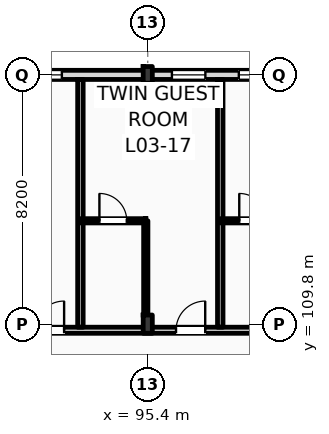
"""IFC4 building model, lengths in metres.
Left out: names, types, materials, properties, quantities, classifications, styles, units other than length and angle.
Written with IfcOpenShell. Run it as: python <this file> out.ifc"""

import sys

from ifc_helpers import new_model, si_unit, direction, frame, frame_2d, origin, origin_2d, place, context, subcontext, project, spatial, rectangle, i_section, extrude, element, fill, save


model = new_model("IFC4")
c1 = context("Model", 3, precision=1e-05, world=origin(), true_north=direction((0.0, 1.0)))
c2 = subcontext(c1, "Body", "Model", "MODEL_VIEW")
j1 = project(units=[si_unit("LENGTHUNIT", "METRE"), si_unit("PLANEANGLEUNIT", "RADIAN")], contexts=[c1])
p1 = place(None, origin())
s1 = spatial("IfcSite", under=j1, at=p1, CompositionType="ELEMENT")
p2 = place(p1, origin())
s2 = spatial("IfcBuilding", under=s1, at=p2, CompositionType="ELEMENT")
p3 = place(p2, frame((0.0, 0.0, 16.2)))
s3 = spatial("IfcBuildingStorey", under=s2, at=p3, CompositionType="ELEMENT", Elevation=16.2)
p4 = place(p3, frame((95.4, 109.8, 0.0), z_axis=(0.0, 0.0, 1.0), x_axis=(1.0, 0.0, 0.0)))
e1 = element("IfcColumn", 1, at=p4, inside=s3, PredefinedType="COLUMN", context=c2, shape_type="SweptSolid", body=[
    extrude(i_section(OverallWidth=0.3, OverallDepth=0.6, WebThickness=0.015, FlangeThickness=0.03, FilletRadius=0.027, at=origin_2d()), origin(), (0.0, 0.0, 1.0), 4.2),
])
p5 = place(p3, frame((95.4, 118.0, 0.0), z_axis=(0.0, 0.0, 1.0), x_axis=(1.0, 0.0, 0.0)))
e2 = element("IfcColumn", 2, at=p5, inside=s3, PredefinedType="COLUMN", context=c2, shape_type="SweptSolid", body=[
    extrude(i_section(OverallWidth=0.3, OverallDepth=0.55, WebThickness=0.015, FlangeThickness=0.029, FilletRadius=0.027, at=origin_2d()), origin(), (0.0, 0.0, 1.0), 4.2),
])
p6 = place(p3, frame((22.5, 118.0, 0.0), z_axis=(0.0, 0.0, 1.0), x_axis=(1.0, 0.0, 0.0)))
e3 = element("IfcWall", 3, at=p6, inside=s3, PredefinedType="STANDARD", context=c2, shape_type="SweptSolid", body=[
    extrude(rectangle(XDim=97.5, YDim=0.3, at=frame_2d((48.75, 0.0))), origin(), (0.0, 0.0, 1.0), 3.36),
])
p7 = place(p6, frame((3.721, 0.0, 0.9)))
e4 = element("IfcOpeningElement", 4, at=p7, cuts=e3, PredefinedType="OPENING", context=c2, shape_type="SweptSolid", body=[
    extrude(rectangle(XDim=0.9, YDim=1.8, at=frame_2d((0.45, 0.9))), frame((0.0, 0.16, 0.0), z_axis=(0.0, -1.0, 0.0), x_axis=(1.0, 0.0, 0.0)), (0.0, 0.0, 1.0), 0.32),
])
p8 = place(p6, frame((6.447, 0.0, 0.9)))
e5 = element("IfcOpeningElement", 5, at=p8, cuts=e3, PredefinedType="OPENING", context=c2, shape_type="SweptSolid", body=[
    extrude(rectangle(XDim=1.35, YDim=1.85, at=frame_2d((0.675, 0.925))), frame((0.0, 0.16, 0.0), z_axis=(0.0, -1.0, 0.0), x_axis=(1.0, 0.0, 0.0)), (0.0, 0.0, 1.0), 0.32),
])
p9 = place(p6, frame((11.363, 0.0, 0.9)))
e6 = element("IfcOpeningElement", 6, at=p9, cuts=e3, PredefinedType="OPENING", context=c2, shape_type="SweptSolid", body=[
    extrude(rectangle(XDim=1.5, YDim=1.9, at=frame_2d((0.75, 0.95))), frame((0.0, 0.16, 0.0), z_axis=(0.0, -1.0, 0.0), x_axis=(1.0, 0.0, 0.0)), (0.0, 0.0, 1.0), 0.32),
])
p10 = place(p6, frame((15.078, 0.0, 0.9)))
e7 = element("IfcOpeningElement", 7, at=p10, cuts=e3, PredefinedType="OPENING", context=c2, shape_type="SweptSolid", body=[
    extrude(rectangle(XDim=1.65, YDim=1.95, at=frame_2d((0.825, 0.975))), frame((0.0, 0.16, 0.0), z_axis=(0.0, -1.0, 0.0), x_axis=(1.0, 0.0, 0.0)), (0.0, 0.0, 1.0), 0.32),
])
p11 = place(p6, frame((19.395, 0.0, 0.9)))
e8 = element("IfcOpeningElement", 8, at=p11, cuts=e3, PredefinedType="OPENING", context=c2, shape_type="SweptSolid", body=[
    extrude(rectangle(XDim=1.8, YDim=2.0, at=frame_2d((0.9, 1.0))), frame((0.0, 0.16, 0.0), z_axis=(0.0, -1.0, 0.0), x_axis=(1.0, 0.0, 0.0)), (0.0, 0.0, 1.0), 0.32),
])
p12 = place(p6, frame((23.31, 0.0, 0.9)))
e9 = element("IfcOpeningElement", 9, at=p12, cuts=e3, PredefinedType="OPENING", context=c2, shape_type="SweptSolid", body=[
    extrude(rectangle(XDim=1.95, YDim=2.05, at=frame_2d((0.975, 1.025))), frame((0.0, 0.16, 0.0), z_axis=(0.0, -1.0, 0.0), x_axis=(1.0, 0.0, 0.0)), (0.0, 0.0, 1.0), 0.32),
])
p13 = place(p6, frame((28.026, 0.0, 0.9)))
e10 = element("IfcOpeningElement", 10, at=p13, cuts=e3, PredefinedType="OPENING", context=c2, shape_type="SweptSolid", body=[
    extrude(rectangle(XDim=2.1, YDim=2.1, at=frame_2d((1.05, 1.05))), frame((0.0, 0.16, 0.0), z_axis=(0.0, -1.0, 0.0), x_axis=(1.0, 0.0, 0.0)), (0.0, 0.0, 1.0), 0.32),
])
p14 = place(p6, frame((31.941, 0.0, 0.9)))
e11 = element("IfcOpeningElement", 11, at=p14, cuts=e3, PredefinedType="OPENING", context=c2, shape_type="SweptSolid", body=[
    extrude(rectangle(XDim=1.1, YDim=2.15, at=frame_2d((0.55, 1.075))), frame((0.0, 0.16, 0.0), z_axis=(0.0, -1.0, 0.0), x_axis=(1.0, 0.0, 0.0)), (0.0, 0.0, 1.0), 0.32),
])
p15 = place(p6, frame((36.657, 0.0, 0.9)))
e12 = element("IfcOpeningElement", 12, at=p15, cuts=e3, PredefinedType="OPENING", context=c2, shape_type="SweptSolid", body=[
    extrude(rectangle(XDim=2.4, YDim=2.2, at=frame_2d((1.2, 1.1))), frame((0.0, 0.16, 0.0), z_axis=(0.0, -1.0, 0.0), x_axis=(1.0, 0.0, 0.0)), (0.0, 0.0, 1.0), 0.32),
])
p16 = place(p6, frame((42.574, 0.0, 0.9)))
e13 = element("IfcOpeningElement", 13, at=p16, cuts=e3, PredefinedType="OPENING", context=c2, shape_type="SweptSolid", body=[
    extrude(rectangle(XDim=1.35, YDim=2.25, at=frame_2d((0.675, 1.125))), frame((0.0, 0.16, 0.0), z_axis=(0.0, -1.0, 0.0), x_axis=(1.0, 0.0, 0.0)), (0.0, 0.0, 1.0), 0.32),
])
p17 = place(p6, frame((45.289, 0.0, 0.9)))
e14 = element("IfcOpeningElement", 14, at=p17, cuts=e3, PredefinedType="OPENING", context=c2, shape_type="SweptSolid", body=[
    extrude(rectangle(XDim=2.7, YDim=2.28, at=frame_2d((1.35, 1.14))), frame((0.0, 0.16, 0.0), z_axis=(0.0, -1.0, 0.0), x_axis=(1.0, 0.0, 0.0)), (0.0, 0.0, 1.0), 0.32),
])
p18 = place(p6, frame((50.406, 0.0, 0.9)))
e15 = element("IfcOpeningElement", 15, at=p18, cuts=e3, PredefinedType="OPENING", context=c2, shape_type="SweptSolid", body=[
    extrude(rectangle(XDim=1.8, YDim=2.28, at=frame_2d((0.9, 1.14))), frame((0.0, 0.16, 0.0), z_axis=(0.0, -1.0, 0.0), x_axis=(1.0, 0.0, 0.0)), (0.0, 0.0, 1.0), 0.32),
])
p19 = place(p6, frame((53.922, 0.0, 0.9)))
e16 = element("IfcOpeningElement", 16, at=p19, cuts=e3, PredefinedType="OPENING", context=c2, shape_type="SweptSolid", body=[
    extrude(rectangle(XDim=1.8, YDim=2.28, at=frame_2d((0.9, 1.14))), frame((0.0, 0.16, 0.0), z_axis=(0.0, -1.0, 0.0), x_axis=(1.0, 0.0, 0.0)), (0.0, 0.0, 1.0), 0.32),
])
p20 = place(p6, frame((58.332, 0.0, 0.9)))
e17 = element("IfcOpeningElement", 17, at=p20, cuts=e3, PredefinedType="OPENING", context=c2, shape_type="SweptSolid", body=[
    extrude(rectangle(XDim=2.961, YDim=2.28, at=frame_2d((1.48, 1.14))), frame((0.0, 0.16, 0.0), z_axis=(0.0, -1.0, 0.0), x_axis=(1.0, 0.0, 0.0)), (0.0, 0.0, 1.0), 0.32),
])
p21 = place(p6, frame((62.513, 0.0, 0.9)))
e18 = element("IfcOpeningElement", 18, at=p21, cuts=e3, PredefinedType="OPENING", context=c2, shape_type="SweptSolid", body=[
    extrude(rectangle(XDim=1.8, YDim=2.28, at=frame_2d((0.9, 1.14))), frame((0.0, 0.16, 0.0), z_axis=(0.0, -1.0, 0.0), x_axis=(1.0, 0.0, 0.0)), (0.0, 0.0, 1.0), 0.32),
])
p22 = place(p6, frame((67.114, 0.0, 0.9)))
e19 = element("IfcOpeningElement", 19, at=p22, cuts=e3, PredefinedType="OPENING", context=c2, shape_type="SweptSolid", body=[
    extrude(rectangle(XDim=2.961, YDim=2.28, at=frame_2d((1.48, 1.14))), frame((0.0, 0.16, 0.0), z_axis=(0.0, -1.0, 0.0), x_axis=(1.0, 0.0, 0.0)), (0.0, 0.0, 1.0), 0.32),
])
p23 = place(p6, frame((73.695, 0.0, 0.9)))
e20 = element("IfcOpeningElement", 20, at=p23, cuts=e3, PredefinedType="OPENING", context=c2, shape_type="SweptSolid", body=[
    extrude(rectangle(XDim=1.1, YDim=2.28, at=frame_2d((0.55, 1.14))), frame((0.0, 0.16, 0.0), z_axis=(0.0, -1.0, 0.0), x_axis=(1.0, 0.0, 0.0)), (0.0, 0.0, 1.0), 0.32),
])
p24 = place(p6, frame((75.895, 0.0, 0.9)))
e21 = element("IfcOpeningElement", 21, at=p24, cuts=e3, PredefinedType="OPENING", context=c2, shape_type="SweptSolid", body=[
    extrude(rectangle(XDim=2.961, YDim=2.28, at=frame_2d((1.48, 1.14))), frame((0.0, 0.16, 0.0), z_axis=(0.0, -1.0, 0.0), x_axis=(1.0, 0.0, 0.0)), (0.0, 0.0, 1.0), 0.32),
])
p25 = place(p6, frame((81.676, 0.0, 0.9)))
e22 = element("IfcOpeningElement", 22, at=p25, cuts=e3, PredefinedType="OPENING", context=c2, shape_type="SweptSolid", body=[
    extrude(rectangle(XDim=1.8, YDim=2.28, at=frame_2d((0.9, 1.14))), frame((0.0, 0.16, 0.0), z_axis=(0.0, -1.0, 0.0), x_axis=(1.0, 0.0, 0.0)), (0.0, 0.0, 1.0), 0.32),
])
p26 = place(p6, frame((84.677, 0.0, 0.9)))
e23 = element("IfcOpeningElement", 23, at=p26, cuts=e3, PredefinedType="OPENING", context=c2, shape_type="SweptSolid", body=[
    extrude(rectangle(XDim=2.961, YDim=2.28, at=frame_2d((1.48, 1.14))), frame((0.0, 0.16, 0.0), z_axis=(0.0, -1.0, 0.0), x_axis=(1.0, 0.0, 0.0)), (0.0, 0.0, 1.0), 0.32),
])
p27 = place(p6, frame((89.999, 0.0, 0.9)))
e24 = element("IfcOpeningElement", 24, at=p27, cuts=e3, PredefinedType="OPENING", context=c2, shape_type="SweptSolid", body=[
    extrude(rectangle(XDim=1.1, YDim=1.5, at=frame_2d((0.55, 0.75))), frame((0.0, 0.16, 0.0), z_axis=(0.0, -1.0, 0.0), x_axis=(1.0, 0.0, 0.0)), (0.0, 0.0, 1.0), 0.32),
])
p28 = place(p6, frame((94.35, 0.0, 0.9)))
e25 = element("IfcOpeningElement", 25, at=p28, cuts=e3, PredefinedType="OPENING", context=c2, shape_type="SweptSolid", body=[
    extrude(rectangle(XDim=1.25, YDim=1.6, at=frame_2d((0.625, 0.8))), frame((0.0, 0.16, 0.0), z_axis=(0.0, -1.0, 0.0), x_axis=(1.0, 0.0, 0.0)), (0.0, 0.0, 1.0), 0.32),
])
p29 = place(p3, frame((10.65, 109.6, 0.0), z_axis=(0.0, 0.0, 1.0), x_axis=(1.0, 0.0, 0.0)))
e26 = element("IfcWall", 26, at=p29, inside=s3, PredefinedType="PARTITIONING", context=c2, shape_type="SweptSolid", body=[
    extrude(rectangle(XDim=109.21, YDim=0.2, at=frame_2d((54.605, 0.0))), origin(), (0.0, 0.0, 1.0), 3.36),
])
p30 = place(p29, frame((15.43, 0.0, 0.0)))
e27 = element("IfcOpeningElement", 27, at=p30, cuts=e26, PredefinedType="OPENING", context=c2, shape_type="SweptSolid", body=[
    extrude(rectangle(XDim=1.02, YDim=2.2, at=frame_2d((0.51, 1.1))), frame((0.0, 0.11, 0.0), z_axis=(0.0, -1.0, 0.0), x_axis=(1.0, 0.0, 0.0)), (0.0, 0.0, 1.0), 0.22),
])
p31 = place(p29, frame((19.537, 0.0, 0.0)))
e28 = element("IfcOpeningElement", 28, at=p31, cuts=e26, PredefinedType="OPENING", context=c2, shape_type="SweptSolid", body=[
    extrude(rectangle(XDim=1.02, YDim=2.2, at=frame_2d((0.51, 1.1))), frame((0.0, 0.11, 0.0), z_axis=(0.0, -1.0, 0.0), x_axis=(1.0, 0.0, 0.0)), (0.0, 0.0, 1.0), 0.22),
])
p32 = place(p29, frame((23.928, 0.0, 0.0)))
e29 = element("IfcOpeningElement", 29, at=p32, cuts=e26, PredefinedType="OPENING", context=c2, shape_type="SweptSolid", body=[
    extrude(rectangle(XDim=1.02, YDim=2.2, at=frame_2d((0.51, 1.1))), frame((0.0, 0.11, 0.0), z_axis=(0.0, -1.0, 0.0), x_axis=(1.0, 0.0, 0.0)), (0.0, 0.0, 1.0), 0.22),
])
p33 = place(p29, frame((26.169, 0.0, 0.0)))
e30 = element("IfcOpeningElement", 30, at=p33, cuts=e26, PredefinedType="OPENING", context=c2, shape_type="SweptSolid", body=[
    extrude(rectangle(XDim=1.02, YDim=2.2, at=frame_2d((0.51, 1.1))), frame((0.0, 0.11, 0.0), z_axis=(0.0, -1.0, 0.0), x_axis=(1.0, 0.0, 0.0)), (0.0, 0.0, 1.0), 0.22),
])
p34 = place(p29, frame((32.739, 0.0, 0.0)))
e31 = element("IfcOpeningElement", 31, at=p34, cuts=e26, PredefinedType="OPENING", context=c2, shape_type="SweptSolid", body=[
    extrude(rectangle(XDim=0.96, YDim=2.2, at=frame_2d((0.48, 1.1))), frame((0.0, 0.11, 0.0), z_axis=(0.0, -1.0, 0.0), x_axis=(1.0, 0.0, 0.0)), (0.0, 0.0, 1.0), 0.22),
])
p35 = place(p29, frame((34.98, 0.0, 0.0)))
e32 = element("IfcOpeningElement", 32, at=p35, cuts=e26, PredefinedType="OPENING", context=c2, shape_type="SweptSolid", body=[
    extrude(rectangle(XDim=0.96, YDim=2.2, at=frame_2d((0.48, 1.1))), frame((0.0, 0.11, 0.0), z_axis=(0.0, -1.0, 0.0), x_axis=(1.0, 0.0, 0.0)), (0.0, 0.0, 1.0), 0.22),
])
p36 = place(p29, frame((41.521, 0.0, 0.0)))
e33 = element("IfcOpeningElement", 33, at=p36, cuts=e26, PredefinedType="OPENING", context=c2, shape_type="SweptSolid", body=[
    extrude(rectangle(XDim=0.96, YDim=2.2, at=frame_2d((0.48, 1.1))), frame((0.0, 0.11, 0.0), z_axis=(0.0, -1.0, 0.0), x_axis=(1.0, 0.0, 0.0)), (0.0, 0.0, 1.0), 0.22),
])
p37 = place(p29, frame((43.512, 0.0, 0.0)))
e34 = element("IfcOpeningElement", 34, at=p37, cuts=e26, PredefinedType="OPENING", context=c2, shape_type="SweptSolid", body=[
    extrude(rectangle(XDim=0.96, YDim=2.2, at=frame_2d((0.48, 1.1))), frame((0.0, 0.11, 0.0), z_axis=(0.0, -1.0, 0.0), x_axis=(1.0, 0.0, 0.0)), (0.0, 0.0, 1.0), 0.22),
])
p38 = place(p29, frame((50.303, 0.0, 0.0)))
e35 = element("IfcOpeningElement", 35, at=p38, cuts=e26, PredefinedType="OPENING", context=c2, shape_type="SweptSolid", body=[
    extrude(rectangle(XDim=0.96, YDim=2.2, at=frame_2d((0.48, 1.1))), frame((0.0, 0.11, 0.0), z_axis=(0.0, -1.0, 0.0), x_axis=(1.0, 0.0, 0.0)), (0.0, 0.0, 1.0), 0.22),
])
p39 = place(p29, frame((54.944, 0.0, 0.0)))
e36 = element("IfcOpeningElement", 36, at=p39, cuts=e26, PredefinedType="OPENING", context=c2, shape_type="SweptSolid", body=[
    extrude(rectangle(XDim=0.96, YDim=2.2, at=frame_2d((0.48, 1.1))), frame((0.0, 0.11, 0.0), z_axis=(0.0, -1.0, 0.0), x_axis=(1.0, 0.0, 0.0)), (0.0, 0.0, 1.0), 0.22),
])
p40 = place(p29, frame((59.085, 0.0, 0.0)))
e37 = element("IfcOpeningElement", 37, at=p40, cuts=e26, PredefinedType="OPENING", context=c2, shape_type="SweptSolid", body=[
    extrude(rectangle(XDim=0.96, YDim=2.2, at=frame_2d((0.48, 1.1))), frame((0.0, 0.11, 0.0), z_axis=(0.0, -1.0, 0.0), x_axis=(1.0, 0.0, 0.0)), (0.0, 0.0, 1.0), 0.22),
])
p41 = place(p29, frame((63.476, 0.0, 0.0)))
e38 = element("IfcOpeningElement", 38, at=p41, cuts=e26, PredefinedType="OPENING", context=c2, shape_type="SweptSolid", body=[
    extrude(rectangle(XDim=0.96, YDim=2.2, at=frame_2d((0.48, 1.1))), frame((0.0, 0.11, 0.0), z_axis=(0.0, -1.0, 0.0), x_axis=(1.0, 0.0, 0.0)), (0.0, 0.0, 1.0), 0.22),
])
p42 = place(p29, frame((65.716, 0.0, 0.0)))
e39 = element("IfcOpeningElement", 39, at=p42, cuts=e26, PredefinedType="OPENING", context=c2, shape_type="SweptSolid", body=[
    extrude(rectangle(XDim=0.96, YDim=2.2, at=frame_2d((0.48, 1.1))), frame((0.0, 0.11, 0.0), z_axis=(0.0, -1.0, 0.0), x_axis=(1.0, 0.0, 0.0)), (0.0, 0.0, 1.0), 0.22),
])
p43 = place(p29, frame((72.257, 0.0, 0.0)))
e40 = element("IfcOpeningElement", 40, at=p43, cuts=e26, PredefinedType="OPENING", context=c2, shape_type="SweptSolid", body=[
    extrude(rectangle(XDim=0.96, YDim=2.2, at=frame_2d((0.48, 1.1))), frame((0.0, 0.11, 0.0), z_axis=(0.0, -1.0, 0.0), x_axis=(1.0, 0.0, 0.0)), (0.0, 0.0, 1.0), 0.22),
])
p44 = place(p29, frame((74.498, 0.0, 0.0)))
e41 = element("IfcOpeningElement", 41, at=p44, cuts=e26, PredefinedType="OPENING", context=c2, shape_type="SweptSolid", body=[
    extrude(rectangle(XDim=0.96, YDim=2.2, at=frame_2d((0.48, 1.1))), frame((0.0, 0.11, 0.0), z_axis=(0.0, -1.0, 0.0), x_axis=(1.0, 0.0, 0.0)), (0.0, 0.0, 1.0), 0.22),
])
p45 = place(p29, frame((81.039, 0.0, 0.0)))
e42 = element("IfcOpeningElement", 42, at=p45, cuts=e26, PredefinedType="OPENING", context=c2, shape_type="SweptSolid", body=[
    extrude(rectangle(XDim=0.96, YDim=2.2, at=frame_2d((0.48, 1.1))), frame((0.0, 0.11, 0.0), z_axis=(0.0, -1.0, 0.0), x_axis=(1.0, 0.0, 0.0)), (0.0, 0.0, 1.0), 0.22),
])
p46 = place(p29, frame((85.68, 0.0, 0.0)))
e43 = element("IfcOpeningElement", 43, at=p46, cuts=e26, PredefinedType="OPENING", context=c2, shape_type="SweptSolid", body=[
    extrude(rectangle(XDim=0.96, YDim=2.2, at=frame_2d((0.48, 1.1))), frame((0.0, 0.11, 0.0), z_axis=(0.0, -1.0, 0.0), x_axis=(1.0, 0.0, 0.0)), (0.0, 0.0, 1.0), 0.22),
])
p47 = place(p29, frame((89.82, 0.0, 0.0)))
e44 = element("IfcOpeningElement", 44, at=p47, cuts=e26, PredefinedType="OPENING", context=c2, shape_type="SweptSolid", body=[
    extrude(rectangle(XDim=0.96, YDim=2.2, at=frame_2d((0.48, 1.1))), frame((0.0, 0.11, 0.0), z_axis=(0.0, -1.0, 0.0), x_axis=(1.0, 0.0, 0.0)), (0.0, 0.0, 1.0), 0.22),
])
p48 = place(p29, frame((94.211, 0.0, 0.0)))
e45 = element("IfcOpeningElement", 45, at=p48, cuts=e26, PredefinedType="OPENING", context=c2, shape_type="SweptSolid", body=[
    extrude(rectangle(XDim=0.96, YDim=2.2, at=frame_2d((0.48, 1.1))), frame((0.0, 0.11, 0.0), z_axis=(0.0, -1.0, 0.0), x_axis=(1.0, 0.0, 0.0)), (0.0, 0.0, 1.0), 0.22),
])
p49 = place(p29, frame((98.602, 0.0, 0.0)))
e46 = element("IfcOpeningElement", 46, at=p49, cuts=e26, PredefinedType="OPENING", context=c2, shape_type="SweptSolid", body=[
    extrude(rectangle(XDim=0.96, YDim=2.2, at=frame_2d((0.48, 1.1))), frame((0.0, 0.11, 0.0), z_axis=(0.0, -1.0, 0.0), x_axis=(1.0, 0.0, 0.0)), (0.0, 0.0, 1.0), 0.22),
])
p50 = place(p29, frame((102.993, 0.0, 0.0)))
e47 = element("IfcOpeningElement", 47, at=p50, cuts=e26, PredefinedType="OPENING", context=c2, shape_type="SweptSolid", body=[
    extrude(rectangle(XDim=0.96, YDim=2.2, at=frame_2d((0.48, 1.1))), frame((0.0, 0.11, 0.0), z_axis=(0.0, -1.0, 0.0), x_axis=(1.0, 0.0, 0.0)), (0.0, 0.0, 1.0), 0.22),
])
p51 = place(p29, frame((105.269, 0.0, 0.0)))
e48 = element("IfcOpeningElement", 48, at=p51, cuts=e26, PredefinedType="OPENING", context=c2, shape_type="SweptSolid", body=[
    extrude(rectangle(XDim=0.96, YDim=2.2, at=frame_2d((0.48, 1.1))), frame((0.0, 0.11, 0.0), z_axis=(0.0, -1.0, 0.0), x_axis=(1.0, 0.0, 0.0)), (0.0, 0.0, 1.0), 0.22),
])
p52 = place(p29, frame((2.716, 0.0, 0.0)))
e49 = element("IfcOpeningElement", 49, at=p52, cuts=e26, PredefinedType="OPENING", context=c2, shape_type="SweptSolid", body=[
    extrude(rectangle(XDim=1.35, YDim=2.25, at=frame_2d((0.675, 1.125))), frame((0.0, 0.11, 0.0), z_axis=(0.0, -1.0, 0.0), x_axis=(1.0, 0.0, 0.0)), (0.0, 0.0, 1.0), 0.22),
])
p53 = place(p29, frame((6.65, 0.0, 0.0)))
e50 = element("IfcOpeningElement", 50, at=p53, cuts=e26, PredefinedType="OPENING", context=c2, shape_type="SweptSolid", body=[
    extrude(rectangle(XDim=1.35, YDim=2.25, at=frame_2d((0.675, 1.125))), frame((0.0, 0.11, 0.0), z_axis=(0.0, -1.0, 0.0), x_axis=(1.0, 0.0, 0.0)), (0.0, 0.0, 1.0), 0.22),
])
p54 = place(p29, frame((10.583, 0.0, 0.0)))
e51 = element("IfcOpeningElement", 51, at=p54, cuts=e26, PredefinedType="OPENING", context=c2, shape_type="SweptSolid", body=[
    extrude(rectangle(XDim=1.35, YDim=2.25, at=frame_2d((0.675, 1.125))), frame((0.0, 0.11, 0.0), z_axis=(0.0, -1.0, 0.0), x_axis=(1.0, 0.0, 0.0)), (0.0, 0.0, 1.0), 0.22),
])
p55 = place(p3, frame((93.185, 109.7, 0.0), z_axis=(0.0, 0.0, 1.0), x_axis=(0.0, 1.0, 0.0)))
e52 = element("IfcWall", 52, at=p55, inside=s3, PredefinedType="PARTITIONING", context=c2, shape_type="SweptSolid", body=[
    extrude(rectangle(XDim=8.15, YDim=0.18, at=frame_2d((4.075, 0.0))), origin(), (0.0, 0.0, 1.0), 3.92),
])
p56 = place(p3, frame((97.785, 109.7, 0.0), z_axis=(0.0, 0.0, 1.0), x_axis=(0.0, 1.0, 0.0)))
e53 = element("IfcWall", 53, at=p56, inside=s3, PredefinedType="PARTITIONING", context=c2, shape_type="SweptSolid", body=[
    extrude(rectangle(XDim=8.15, YDim=0.18, at=frame_2d((4.075, 0.0))), origin(), (0.0, 0.0, 1.0), 3.61),
])
p57 = place(p3, frame((95.335, 109.7, 0.0), z_axis=(0.0, 0.0, 1.0), x_axis=(0.0, 1.0, 0.0)))
e54 = element("IfcWall", 54, at=p57, inside=s3, PredefinedType="PARTITIONING", context=c2, shape_type="SweptSolid", body=[
    extrude(rectangle(XDim=3.5, YDim=0.14, at=frame_2d((1.75, 0.0))), origin(), (0.0, 0.0, 1.0), 3.51),
])
p58 = place(p3, frame((93.185, 113.2, 0.0), z_axis=(0.0, 0.0, 1.0), x_axis=(1.0, 0.0, 0.0)))
e55 = element("IfcWall", 55, at=p58, inside=s3, PredefinedType="PARTITIONING", context=c2, shape_type="SweptSolid", body=[
    extrude(rectangle(XDim=2.15, YDim=0.14, at=frame_2d((1.075, 0.0))), origin(), (0.0, 0.0, 1.0), 3.92),
])
p59 = place(p58, frame((0.625, 0.0, 0.0)))
e56 = element("IfcOpeningElement", 56, at=p59, cuts=e55, PredefinedType="OPENING", context=c2, shape_type="SweptSolid", body=[
    extrude(rectangle(XDim=0.9, YDim=2.1, at=frame_2d((0.45, 1.05))), frame((0.0, 0.08, 0.0), z_axis=(0.0, -1.0, 0.0), x_axis=(1.0, 0.0, 0.0)), (0.0, 0.0, 1.0), 0.16),
])
p60 = place(p3, frame((97.785, 113.2, 0.0), z_axis=(0.0, 0.0, 1.0), x_axis=(1.0, 0.0, 0.0)))
e57 = element("IfcWall", 57, at=p60, inside=s3, PredefinedType="PARTITIONING", context=c2, shape_type="SweptSolid", body=[
    extrude(rectangle(XDim=2.15, YDim=0.14, at=frame_2d((1.075, 0.0))), origin(), (0.0, 0.0, 1.0), 3.92),
])
p61 = place(p60, frame((0.625, 0.0, 0.0)))
e58 = element("IfcOpeningElement", 58, at=p61, cuts=e57, PredefinedType="OPENING", context=c2, shape_type="SweptSolid", body=[
    extrude(rectangle(XDim=0.9, YDim=2.1, at=frame_2d((0.45, 1.05))), frame((0.0, 0.08, 0.0), z_axis=(0.0, -1.0, 0.0), x_axis=(1.0, 0.0, 0.0)), (0.0, 0.0, 1.0), 0.16),
])
p62 = place(p22, origin())
e59 = element("IfcWindow", 59, at=p62, inside=s3, PartitioningType="DOUBLE_PANEL_VERTICAL", PredefinedType="WINDOW", context=c2, shape_type="SweptSolid", body=[
    extrude(rectangle(XDim=2.961, YDim=2.28, at=frame_2d((1.48, 1.14))), frame((0.0, 0.03, 0.0), z_axis=(0.0, -1.0, 0.0), x_axis=(1.0, 0.0, 0.0)), (0.0, 0.0, 1.0), 0.06),
])
fill(e19, e59)
p63 = place(p23, origin())
e60 = element("IfcWindow", 60, at=p63, inside=s3, PartitioningType="DOUBLE_PANEL_VERTICAL", PredefinedType="WINDOW", context=c2, shape_type="SweptSolid", body=[
    extrude(rectangle(XDim=1.1, YDim=2.28, at=frame_2d((0.55, 1.14))), frame((0.0, 0.03, 0.0), z_axis=(0.0, -1.0, 0.0), x_axis=(1.0, 0.0, 0.0)), (0.0, 0.0, 1.0), 0.06),
])
fill(e20, e60)
p64 = place(p24, origin())
e61 = element("IfcWindow", 61, at=p64, inside=s3, PartitioningType="DOUBLE_PANEL_VERTICAL", PredefinedType="WINDOW", context=c2, shape_type="SweptSolid", body=[
    extrude(rectangle(XDim=2.961, YDim=2.28, at=frame_2d((1.48, 1.14))), frame((0.0, 0.03, 0.0), z_axis=(0.0, -1.0, 0.0), x_axis=(1.0, 0.0, 0.0)), (0.0, 0.0, 1.0), 0.06),
])
fill(e21, e61)
p65 = place(p45, origin())
e62 = element("IfcDoor", 62, at=p65, inside=s3, OperationType="SINGLE_SWING_RIGHT", PredefinedType="DOOR", context=c2, shape_type="SweptSolid", body=[
    extrude(rectangle(XDim=0.96, YDim=2.2, at=frame_2d((0.48, 1.1))), frame((0.0, 0.025, 0.0), z_axis=(0.0, -1.0, 0.0), x_axis=(1.0, 0.0, 0.0)), (0.0, 0.0, 1.0), 0.05),
])
fill(e42, e62)
p66 = place(p46, origin())
e63 = element("IfcDoor", 63, at=p66, inside=s3, OperationType="SINGLE_SWING_RIGHT", PredefinedType="DOOR", context=c2, shape_type="SweptSolid", body=[
    extrude(rectangle(XDim=0.96, YDim=2.2, at=frame_2d((0.48, 1.1))), frame((0.0, 0.025, 0.0), z_axis=(0.0, -1.0, 0.0), x_axis=(1.0, 0.0, 0.0)), (0.0, 0.0, 1.0), 0.05),
])
fill(e43, e63)
p67 = place(p59, origin())
e64 = element("IfcDoor", 64, at=p67, inside=s3, OperationType="SINGLE_SWING_LEFT", PredefinedType="DOOR", context=c2, shape_type="SweptSolid", body=[
    extrude(rectangle(XDim=0.9, YDim=2.1, at=frame_2d((0.45, 1.05))), frame((0.0, 0.025, 0.0), z_axis=(0.0, -1.0, 0.0), x_axis=(1.0, 0.0, 0.0)), (0.0, 0.0, 1.0), 0.05),
])
fill(e56, e64)
p68 = place(p61, origin())
e65 = element("IfcDoor", 65, at=p68, inside=s3, OperationType="SINGLE_SWING_LEFT", PredefinedType="DOOR", context=c2, shape_type="SweptSolid", body=[
    extrude(rectangle(XDim=0.9, YDim=2.1, at=frame_2d((0.45, 1.05))), frame((0.0, 0.025, 0.0), z_axis=(0.0, -1.0, 0.0), x_axis=(1.0, 0.0, 0.0)), (0.0, 0.0, 1.0), 0.05),
])
fill(e58, e65)
save(model, sys.argv[1])
